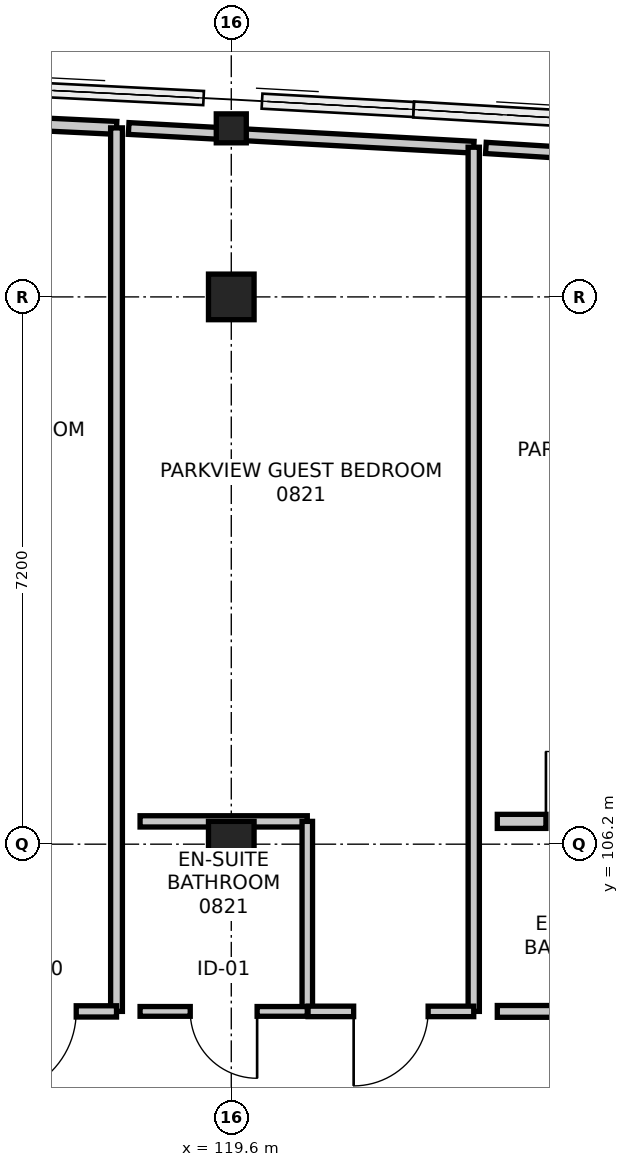
"""IFC4 building model, lengths in metres.
Left out: names, types, materials, properties, quantities, classifications, styles, units other than length and angle.
Written with IfcOpenShell. Run it as: python <this file> out.ifc"""

import sys

from ifc_helpers import new_model, si_unit, direction, frame, frame_2d, origin, origin_2d, place, context, subcontext, project, spatial, rectangle, i_section, extrude, element, fill, save


model = new_model("IFC4")
c1 = context("Model", 3, precision=1e-05, world=origin(), true_north=direction((0.0, 1.0)))
c2 = subcontext(c1, "Body", "Model", "MODEL_VIEW")
j1 = project(units=[si_unit("LENGTHUNIT", "METRE"), si_unit("PLANEANGLEUNIT", "RADIAN")], contexts=[c1])
p1 = place(None, origin())
s1 = spatial("IfcSite", under=j1, at=p1, CompositionType="ELEMENT")
p2 = place(p1, origin())
s2 = spatial("IfcBuilding", under=s1, at=p2, CompositionType="ELEMENT")
p3 = place(p2, frame((0.0, 0.0, 33.6)))
s3 = spatial("IfcBuildingStorey", under=s2, at=p3, CompositionType="ELEMENT", Elevation=33.6)
for number, where, z_axis, x_axis in (
    (1, (119.6, 106.2, 0.0), (0.0, 0.0, 1.0), (1.0, 0.0, 0.0)),
    (2, (119.6, 113.4, 0.0), (0.0, 0.0, 1.0), (1.0, 0.0, 0.0)),
):
    element("IfcColumn", number, at=place(p3, frame(where, z_axis=z_axis, x_axis=x_axis)), inside=s3, PredefinedType="COLUMN", context=c2, shape_type="SweptSolid", body=[
        extrude(rectangle(XDim=0.6, YDim=0.6, at=origin_2d()), origin(), (0.0, 0.0, 1.0), 3.6),
    ])
p4 = place(p3, frame((119.6, 115.618, 0.0), z_axis=(0.0, 0.0, 1.0), x_axis=(1.0, 0.0, 0.0)))
e3 = element("IfcColumn", 3, at=p4, inside=s3, PredefinedType="COLUMN", context=c2, shape_type="SweptSolid", body=[
    extrude(i_section(OverallWidth=0.395, OverallDepth=0.381, WebThickness=0.018, FlangeThickness=0.03, FilletRadius=0.015, at=origin_2d()), origin(), (0.0, 0.0, 1.0), 3.6),
])
p5 = place(p3, frame((115.82, 115.731, 0.0), z_axis=(0.0, 0.0, 1.0), x_axis=(0.998882190977, -0.047269107768, 0.0)))
e4 = element("IfcWall", 4, at=p5, inside=s3, PredefinedType="PARTITIONING", context=c2, shape_type="SweptSolid", body=[
    extrude(rectangle(XDim=2.272, YDim=0.17, at=frame_2d((1.136, 0.0))), origin(), (0.0, 0.0, 1.0), 2.936),
])
p6 = place(p3, frame((118.09, 115.624, 0.0), z_axis=(0.0, 0.0, 1.0), x_axis=(0.0, -1.0, 0.0)))
e5 = element("IfcWall", 5, at=p6, inside=s3, PredefinedType="PARTITIONING", context=c2, shape_type="SweptSolid", body=[
    extrude(rectangle(XDim=11.624, YDim=0.155, at=frame_2d((5.812, 0.0))), origin(), (0.0, 0.0, 1.0), 2.745),
])
p7 = place(p3, frame((118.09, 104.0, 0.0), z_axis=(0.0, 0.0, 1.0), x_axis=(-1.0, 0.0, 0.0)))
e6 = element("IfcWall", 6, at=p7, inside=s3, PredefinedType="PARTITIONING", context=c2, shape_type="SweptSolid", body=[
    extrude(rectangle(XDim=2.18, YDim=0.148, at=frame_2d((1.09, 0.0))), origin(), (0.0, 0.0, 1.0), 3.36),
])
p8 = place(p7, frame((0.53, 0.0, 0.0)))
e7 = element("IfcOpeningElement", 7, at=p8, cuts=e6, PredefinedType="OPENING", context=c2, shape_type="SweptSolid", body=[
    extrude(rectangle(XDim=1.12, YDim=2.2, at=frame_2d((0.56, 1.1))), frame((0.0, 0.084, 0.0), z_axis=(0.0, -1.0, 0.0), x_axis=(1.0, 0.0, 0.0)), (0.0, 0.0, 1.0), 0.168),
])
p9 = place(p3, frame((118.4, 106.5, 0.0), z_axis=(0.0, 0.0, 1.0), x_axis=(1.0, 0.0, 0.0)))
e8 = element("IfcWall", 8, at=p9, inside=s3, PredefinedType="PARTITIONING", context=c2, shape_type="SweptSolid", body=[
    extrude(rectangle(XDim=2.2, YDim=0.148, at=frame_2d((1.1, 0.0))), origin(), (0.0, 0.0, 1.0), 2.695),
])
p10 = place(p3, frame((120.6, 106.5, 0.0), z_axis=(0.0, 0.0, 1.0), x_axis=(0.0, -1.0, 0.0)))
e9 = element("IfcWall", 9, at=p10, inside=s3, PredefinedType="PARTITIONING", context=c2, shape_type="SweptSolid", body=[
    extrude(rectangle(XDim=2.5, YDim=0.138, at=frame_2d((1.25, 0.0))), origin(), (0.0, 0.0, 1.0), 2.745),
])
p11 = place(p3, frame((120.6, 104.0, 0.0), z_axis=(0.0, 0.0, 1.0), x_axis=(-1.0, 0.0, 0.0)))
e10 = element("IfcWall", 10, at=p11, inside=s3, PredefinedType="PARTITIONING", context=c2, shape_type="SweptSolid", body=[
    extrude(rectangle(XDim=2.2, YDim=0.128, at=frame_2d((1.1, 0.0))), origin(), (0.0, 0.0, 1.0), 2.695),
])
p12 = place(p11, frame((0.66, 0.0, 0.0)))
e11 = element("IfcOpeningElement", 11, at=p12, cuts=e10, PredefinedType="OPENING", context=c2, shape_type="SweptSolid", body=[
    extrude(rectangle(XDim=0.88, YDim=2.06, at=frame_2d((0.44, 1.03))), frame((0.0, 0.074, 0.0), z_axis=(0.0, -1.0, 0.0), x_axis=(1.0, 0.0, 0.0)), (0.0, 0.0, 1.0), 0.148),
])
p13 = place(p3, frame((118.25, 115.615, 0.0), z_axis=(0.0, 0.0, 1.0), x_axis=(0.998531223826, -0.054179286128, 0.0)))
e12 = element("IfcWall", 12, at=p13, inside=s3, PredefinedType="PARTITIONING", context=c2, shape_type="SweptSolid", body=[
    extrude(rectangle(XDim=4.547, YDim=0.155, at=frame_2d((2.273, 0.0))), origin(), (0.0, 0.0, 1.0), 2.936),
])
p14 = place(p3, frame((122.79, 115.369, 0.0), z_axis=(0.0, 0.0, 1.0), x_axis=(0.0, -1.0, 0.0)))
e13 = element("IfcWall", 13, at=p14, inside=s3, PredefinedType="PARTITIONING", context=c2, shape_type="SweptSolid", body=[
    extrude(rectangle(XDim=11.369, YDim=0.148, at=frame_2d((5.685, 0.0))), origin(), (0.0, 0.0, 1.0), 2.745),
])
p15 = place(p3, frame((122.79, 104.0, 0.0), z_axis=(0.0, 0.0, 1.0), x_axis=(-1.0, 0.0, 0.0)))
e14 = element("IfcWall", 14, at=p15, inside=s3, PredefinedType="PARTITIONING", context=c2, shape_type="SweptSolid", body=[
    extrude(rectangle(XDim=2.18, YDim=0.138, at=frame_2d((1.09, 0.0))), origin(), (0.0, 0.0, 1.0), 3.36),
])
p16 = place(p15, frame((0.6, 0.0, 0.0)))
e15 = element("IfcOpeningElement", 15, at=p16, cuts=e14, PredefinedType="OPENING", context=c2, shape_type="SweptSolid", body=[
    extrude(rectangle(XDim=0.98, YDim=2.15, at=frame_2d((0.49, 1.075))), frame((0.0, 0.079, 0.0), z_axis=(0.0, -1.0, 0.0), x_axis=(1.0, 0.0, 0.0)), (0.0, 0.0, 1.0), 0.158),
])
p17 = place(p3, frame((123.1, 106.5, 0.0), z_axis=(0.0, 0.0, 1.0), x_axis=(1.0, 0.0, 0.0)))
e16 = element("IfcWall", 16, at=p17, inside=s3, PredefinedType="PARTITIONING", context=c2, shape_type="SweptSolid", body=[
    extrude(rectangle(XDim=2.2, YDim=0.185, at=frame_2d((1.1, 0.0))), origin(), (0.0, 0.0, 1.0), 2.745),
])
p18 = place(p17, frame((0.64, 0.0, 0.0)))
e17 = element("IfcOpeningElement", 17, at=p18, cuts=e16, PredefinedType="OPENING", context=c2, shape_type="SweptSolid", body=[
    extrude(rectangle(XDim=0.92, YDim=2.1, at=frame_2d((0.46, 1.05))), frame((0.0, 0.103, 0.0), z_axis=(0.0, -1.0, 0.0), x_axis=(1.0, 0.0, 0.0)), (0.0, 0.0, 1.0), 0.205),
])
p19 = place(p3, frame((125.3, 104.0, 0.0), z_axis=(0.0, 0.0, 1.0), x_axis=(-1.0, 0.0, 0.0)))
e18 = element("IfcWall", 18, at=p19, inside=s3, PredefinedType="PARTITIONING", context=c2, shape_type="SweptSolid", body=[
    extrude(rectangle(XDim=2.2, YDim=0.155, at=frame_2d((1.1, 0.0))), origin(), (0.0, 0.0, 1.0), 3.36),
])
p20 = place(p3, frame((122.95, 115.36, 0.0), z_axis=(0.0, 0.0, 1.0), x_axis=(0.99809329669, -0.061723343256, 0.0)))
e19 = element("IfcWall", 19, at=p20, inside=s3, PredefinedType="PARTITIONING", context=c2, shape_type="SweptSolid", body=[
    extrude(rectangle(XDim=4.549, YDim=0.148, at=frame_2d((2.274, 0.0))), origin(), (0.0, 0.0, 1.0), 2.936),
])
p21 = place(p8, origin())
e20 = element("IfcDoor", 20, at=p21, inside=s3, OperationType="SINGLE_SWING_RIGHT", PredefinedType="DOOR", context=c2, shape_type="SweptSolid", body=[
    extrude(rectangle(XDim=1.12, YDim=2.2, at=frame_2d((0.56, 1.1))), frame((0.0, 0.025, 0.0), z_axis=(0.0, -1.0, 0.0), x_axis=(1.0, 0.0, 0.0)), (0.0, 0.0, 1.0), 0.05),
])
fill(e7, e20)
p22 = place(p12, origin())
e21 = element("IfcDoor", 21, at=p22, inside=s3, OperationType="SINGLE_SWING_LEFT", PredefinedType="DOOR", context=c2, shape_type="SweptSolid", body=[
    extrude(rectangle(XDim=0.88, YDim=2.06, at=frame_2d((0.44, 1.03))), frame((0.0, 0.025, 0.0), z_axis=(0.0, -1.0, 0.0), x_axis=(1.0, 0.0, 0.0)), (0.0, 0.0, 1.0), 0.05),
])
fill(e11, e21)
p23 = place(p16, origin())
e22 = element("IfcDoor", 22, at=p23, inside=s3, OperationType="SINGLE_SWING_RIGHT", PredefinedType="DOOR", context=c2, shape_type="SweptSolid", body=[
    extrude(rectangle(XDim=0.98, YDim=2.15, at=frame_2d((0.49, 1.075))), frame((0.0, 0.025, 0.0), z_axis=(0.0, -1.0, 0.0), x_axis=(1.0, 0.0, 0.0)), (0.0, 0.0, 1.0), 0.05),
])
fill(e15, e22)
p24 = place(p18, origin())
e23 = element("IfcDoor", 23, at=p24, inside=s3, OperationType="SINGLE_SWING_LEFT", PredefinedType="DOOR", context=c2, shape_type="SweptSolid", body=[
    extrude(rectangle(XDim=0.92, YDim=2.1, at=frame_2d((0.46, 1.05))), frame((0.0, 0.025, 0.0), z_axis=(0.0, -1.0, 0.0), x_axis=(1.0, 0.0, 0.0)), (0.0, 0.0, 1.0), 0.05),
])
fill(e17, e23)
save(model, sys.argv[1])
